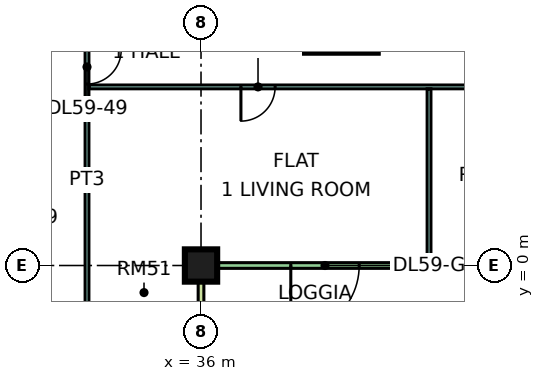
"""IFC4 building model, lengths in metres.
Left out: names, types, materials, properties, quantities, classifications, styles, units other than length and angle.
Written with IfcOpenShell. Run it as: python <this file> out.ifc"""

import sys

from ifc_helpers import new_model, si_unit, direction, frame, frame_2d, origin, origin_2d, place, context, subcontext, project, spatial, rectangle, extrude, element, fill, save


model = new_model("IFC4")
c1 = context("Model", 3, precision=1e-05, world=origin(), true_north=direction((0.0, 1.0)))
c2 = subcontext(c1, "Body", "Model", "MODEL_VIEW")
j1 = project(units=[si_unit("LENGTHUNIT", "METRE"), si_unit("PLANEANGLEUNIT", "RADIAN")], contexts=[c1])
p1 = place(None, origin())
s1 = spatial("IfcSite", under=j1, at=p1, CompositionType="ELEMENT")
p2 = place(p1, origin())
s2 = spatial("IfcBuilding", under=s1, at=p2, CompositionType="ELEMENT")
p3 = place(p2, frame((0.0, 0.0, 249.15)))
s3 = spatial("IfcBuildingStorey", under=s2, at=p3, CompositionType="ELEMENT", Elevation=249.15)
p4 = place(p3, frame((36.0, 0.0, 0.0), z_axis=(0.0, 0.0, 1.0), x_axis=(1.0, 0.0, 0.0)))
e1 = element("IfcColumn", 1, at=p4, inside=s3, PredefinedType="COLUMN", context=c2, shape_type="SweptSolid", body=[
    extrude(rectangle(XDim=0.85, YDim=0.85, at=origin_2d()), origin(), (0.0, 0.0, 1.0), 3.75),
])
p5 = place(p3, frame((37.2, 5.725, 0.0), z_axis=(0.0, 0.0, 1.0), x_axis=(1.0, 0.0, 0.0)))
e2 = element("IfcWall", 2, at=p5, inside=s3, PredefinedType="SHEAR", context=c2, shape_type="SweptSolid", body=[
    extrude(rectangle(XDim=3.45, YDim=0.25, at=frame_2d((1.725, 0.0))), origin(), (0.0, 0.0, 1.0), 3.75),
])
p6 = place(p3, frame((36.075, 0.0, 0.0), z_axis=(0.0, 0.0, 1.0), x_axis=(1.0, 0.0, 0.0)))
e3 = element("IfcWall", 3, at=p6, inside=s3, PredefinedType="SOLIDWALL", context=c2, shape_type="SweptSolid", body=[
    extrude(rectangle(XDim=11.85, YDim=0.15, at=frame_2d((5.925, 0.0))), origin(), (0.0, 0.0, 1.0), 3.35),
])
p7 = place(p6, frame((2.288, 0.0, 0.0)))
e4 = element("IfcOpeningElement", 4, at=p7, cuts=e3, PredefinedType="OPENING", context=c2, shape_type="SweptSolid", body=[
    extrude(rectangle(XDim=1.8, YDim=2.4, at=frame_2d((0.9, 1.2))), frame((0.0, 0.085, 0.0), z_axis=(0.0, -1.0, 0.0), x_axis=(1.0, 0.0, 0.0)), (0.0, 0.0, 1.0), 0.17),
])
p8 = place(p6, frame((6.562, 0.0, 0.45)))
e5 = element("IfcOpeningElement", 5, at=p8, cuts=e3, PredefinedType="OPENING", context=c2, shape_type="SweptSolid", body=[
    extrude(rectangle(XDim=1.2, YDim=2.4, at=frame_2d((0.6, 1.2))), frame((0.0, 0.085, 0.0), z_axis=(0.0, -1.0, 0.0), x_axis=(1.0, 0.0, 0.0)), (0.0, 0.0, 1.0), 0.17),
])
p9 = place(p6, frame((10.05, 0.0, 0.45)))
e6 = element("IfcOpeningElement", 6, at=p9, cuts=e3, PredefinedType="OPENING", context=c2, shape_type="SweptSolid", body=[
    extrude(rectangle(XDim=1.2, YDim=2.4, at=frame_2d((0.6, 1.2))), frame((0.0, 0.085, 0.0), z_axis=(0.0, -1.0, 0.0), x_axis=(1.0, 0.0, 0.0)), (0.0, 0.0, 1.0), 0.17),
])
p10 = place(p3, frame((36.0, -1.5, 0.0), z_axis=(0.0, 0.0, 1.0), x_axis=(0.0, 1.0, 0.0)))
e7 = element("IfcWall", 7, at=p10, inside=s3, PredefinedType="SOLIDWALL", context=c2, shape_type="SweptSolid", body=[
    extrude(rectangle(XDim=1.5, YDim=0.15, at=frame_2d((0.75, 0.0))), origin(), (0.0, 0.0, 1.0), 3.35),
])
p11 = place(p3, frame((33.0, -1.35, 0.0), z_axis=(0.0, 0.0, 1.0), x_axis=(0.0, 1.0, 0.0)))
e8 = element("IfcWall", 8, at=p11, inside=s3, PredefinedType="PARTITIONING", context=c2, shape_type="SweptSolid", body=[
    extrude(rectangle(XDim=7.175, YDim=0.1, at=frame_2d((3.587, 0.0))), origin(), (0.0, 0.0, 1.0), 3.35),
])
p12 = place(p11, frame((6.125, 0.0, 0.0)))
e9 = element("IfcOpeningElement", 9, at=p12, cuts=e8, PredefinedType="OPENING", context=c2, shape_type="SweptSolid", body=[
    extrude(rectangle(XDim=0.9, YDim=2.1, at=frame_2d((0.45, 1.05))), frame((0.0, 0.06, 0.0), z_axis=(0.0, -1.0, 0.0), x_axis=(1.0, 0.0, 0.0)), (0.0, 0.0, 1.0), 0.12),
])
p13 = place(p3, frame((33.05, 4.7, 0.0), z_axis=(0.0, 0.0, 1.0), x_axis=(1.0, 0.0, 0.0)))
e10 = element("IfcWall", 10, at=p13, inside=s3, PredefinedType="PARTITIONING", context=c2, shape_type="SweptSolid", body=[
    extrude(rectangle(XDim=14.85, YDim=0.1, at=frame_2d((7.425, 0.0))), origin(), (0.0, 0.0, 1.0), 3.35),
])
p14 = place(p13, frame((10.0, 0.0, 0.0)))
e11 = element("IfcOpeningElement", 11, at=p14, cuts=e10, PredefinedType="OPENING", context=c2, shape_type="SweptSolid", body=[
    extrude(rectangle(XDim=0.9, YDim=2.1, at=frame_2d((0.45, 1.05))), frame((0.0, 0.06, 0.0), z_axis=(0.0, -1.0, 0.0), x_axis=(1.0, 0.0, 0.0)), (0.0, 0.0, 1.0), 0.12),
])
p15 = place(p13, frame((13.0, 0.0, 0.0)))
e12 = element("IfcOpeningElement", 12, at=p15, cuts=e10, PredefinedType="OPENING", context=c2, shape_type="SweptSolid", body=[
    extrude(rectangle(XDim=0.9, YDim=2.1, at=frame_2d((0.45, 1.05))), frame((0.0, 0.06, 0.0), z_axis=(0.0, -1.0, 0.0), x_axis=(1.0, 0.0, 0.0)), (0.0, 0.0, 1.0), 0.12),
])
p16 = place(p13, frame((4.0, 0.0, 0.0)))
e13 = element("IfcOpeningElement", 13, at=p16, cuts=e10, PredefinedType="OPENING", context=c2, shape_type="SweptSolid", body=[
    extrude(rectangle(XDim=0.9, YDim=2.1, at=frame_2d((0.45, 1.05))), frame((0.0, 0.06, 0.0), z_axis=(0.0, -1.0, 0.0), x_axis=(1.0, 0.0, 0.0)), (0.0, 0.0, 1.0), 0.12),
])
p17 = place(p3, frame((42.0, 0.074, 0.0), z_axis=(0.0, 0.0, 1.0), x_axis=(0.0, 1.0, 0.0)))
e14 = element("IfcWall", 14, at=p17, inside=s3, PredefinedType="PARTITIONING", context=c2, shape_type="SweptSolid", body=[
    extrude(rectangle(XDim=4.576, YDim=0.1, at=frame_2d((2.288, 0.0))), origin(), (0.0, 0.0, 1.0), 3.35),
])
p18 = place(p7, frame((1.8, 0.0, 0.0), z_axis=(0.0, 0.0, 1.0), x_axis=(-1.0, 0.0, 0.0)))
e15 = element("IfcDoor", 15, at=p18, inside=s3, OperationType="DOUBLE_DOOR_SINGLE_SWING", PredefinedType="DOOR", context=c2, shape_type="SweptSolid", body=[
    extrude(rectangle(XDim=1.8, YDim=2.4, at=frame_2d((0.9, 1.2))), frame((0.0, 0.025, 0.0), z_axis=(0.0, -1.0, 0.0), x_axis=(1.0, 0.0, 0.0)), (0.0, 0.0, 1.0), 0.05),
])
fill(e4, e15)
p19 = place(p8, origin())
e16 = element("IfcWindow", 16, at=p19, inside=s3, PartitioningType="SINGLE_PANEL", PredefinedType="WINDOW", context=c2, shape_type="SweptSolid", body=[
    extrude(rectangle(XDim=1.2, YDim=2.4, at=frame_2d((0.6, 1.2))), frame((0.0, 0.03, 0.0), z_axis=(0.0, -1.0, 0.0), x_axis=(1.0, 0.0, 0.0)), (0.0, 0.0, 1.0), 0.06),
])
fill(e5, e16)
p20 = place(p12, origin())
e17 = element("IfcDoor", 17, at=p20, inside=s3, OperationType="SINGLE_SWING_RIGHT", PredefinedType="DOOR", context=c2, shape_type="SweptSolid", body=[
    extrude(rectangle(XDim=0.9, YDim=2.1, at=frame_2d((0.45, 1.05))), frame((0.0, 0.025, 0.0), z_axis=(0.0, -1.0, 0.0), x_axis=(1.0, 0.0, 0.0)), (0.0, 0.0, 1.0), 0.05),
])
fill(e9, e17)
p21 = place(p16, frame((0.9, 0.0, 0.0), z_axis=(0.0, 0.0, 1.0), x_axis=(-1.0, 0.0, 0.0)))
e18 = element("IfcDoor", 18, at=p21, inside=s3, OperationType="SINGLE_SWING_LEFT", PredefinedType="DOOR", context=c2, shape_type="SweptSolid", body=[
    extrude(rectangle(XDim=0.9, YDim=2.1, at=frame_2d((0.45, 1.05))), frame((0.0, 0.025, 0.0), z_axis=(0.0, -1.0, 0.0), x_axis=(1.0, 0.0, 0.0)), (0.0, 0.0, 1.0), 0.05),
])
fill(e13, e18)
save(model, sys.argv[1])
